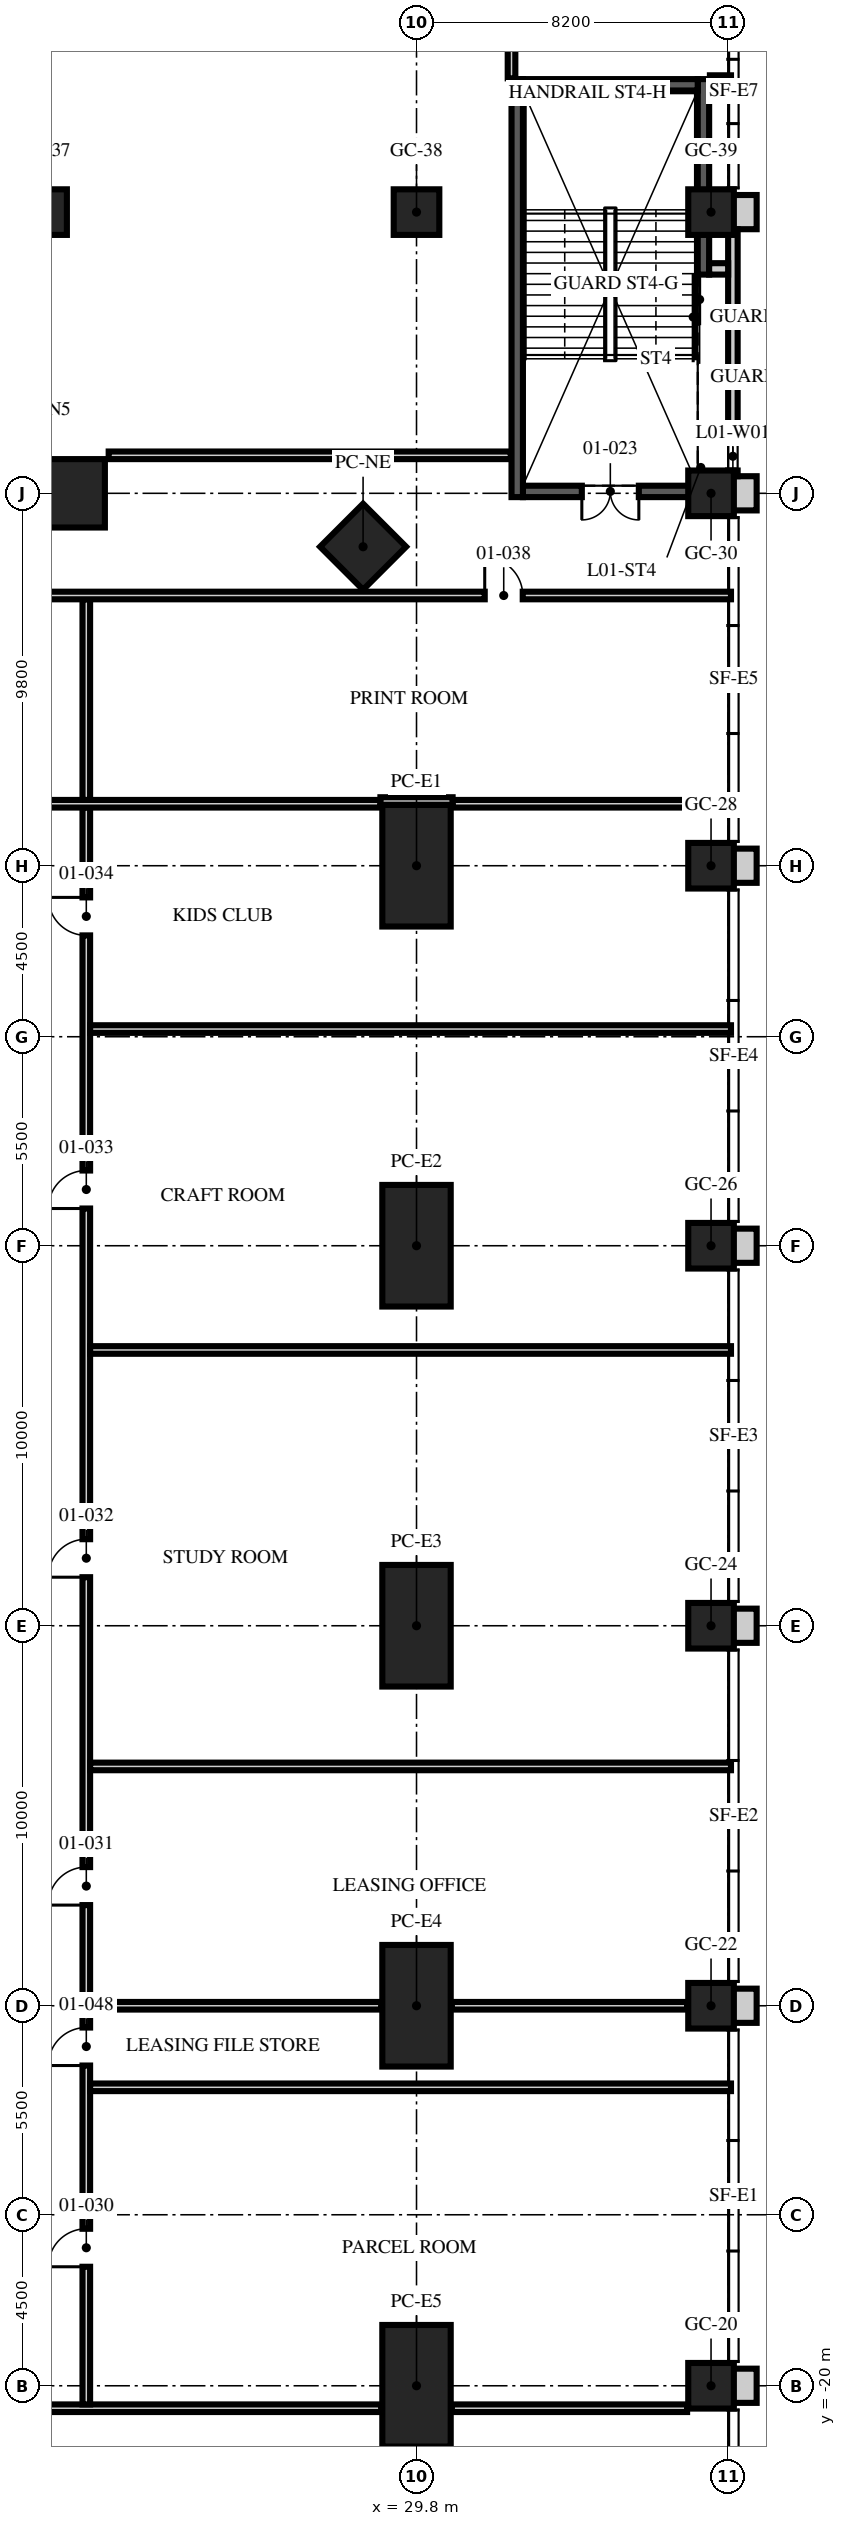
"""IFC4 building model, lengths in metres.
Left out: names, types, materials, properties, quantities, classifications, styles, units other than length and angle.
Written with IfcOpenShell. Run it as: python <this file> out.ifc"""

import sys

from ifc_helpers import new_model, si_unit, direction, frame, frame_2d, origin, origin_2d, place, context, subcontext, project, spatial, rectangle, hollow_rectangle, extrude, element, fill, save


model = new_model("IFC4")
c1 = context("Model", 3, precision=1e-05, world=origin(), true_north=direction((0.0, 1.0)))
c2 = subcontext(c1, "Body", "Model", "MODEL_VIEW")
j1 = project(units=[si_unit("LENGTHUNIT", "METRE"), si_unit("PLANEANGLEUNIT", "RADIAN")], contexts=[c1])
p1 = place(None, origin())
s1 = spatial("IfcSite", under=j1, at=p1, CompositionType="ELEMENT")
p2 = place(p1, origin())
s2 = spatial("IfcBuilding", under=s1, at=p2, CompositionType="ELEMENT")
p3 = place(p2, frame((0.0, 0.0, 6.0)))
s3 = spatial("IfcBuildingStorey", under=s2, at=p3, CompositionType="ELEMENT", Elevation=6.0)
for number, where, z_axis, x_axis in (
    (1, (20.0, 29.8, 0.0), (0.0, 0.0, 1.0), (1.0, 0.0, 0.0)),
    (2, (29.8, 20.0, 0.0), (0.0, 0.0, 1.0), (0.0, 1.0, 0.0)),
    (3, (29.8, 10.0, 0.0), (0.0, 0.0, 1.0), (0.0, 1.0, 0.0)),
    (4, (29.8, 0.0, 0.0), (0.0, 0.0, 1.0), (0.0, 1.0, 0.0)),
    (5, (29.8, -10.0, 0.0), (0.0, 0.0, 1.0), (0.0, 1.0, 0.0)),
    (6, (29.8, -20.0, 0.0), (0.0, 0.0, 1.0), (0.0, 1.0, 0.0)),
):
    element("IfcColumn", number, at=place(p3, frame(where, z_axis=z_axis, x_axis=x_axis)), inside=s3, PredefinedType="COLUMN", context=c2, shape_type="SweptSolid", body=[
        extrude(hollow_rectangle(XDim=3.2, YDim=1.8, WallThickness=0.2, at=origin_2d()), origin(), (0.0, 0.0, 1.0), 5.0),
    ])
p4 = place(p3, frame((28.394, 28.394, 0.0), z_axis=(0.0, 0.0, 1.0), x_axis=(0.707106781187, -0.707106781187, 0.0)))
e7 = element("IfcColumn", 7, at=p4, inside=s3, PredefinedType="COLUMN", context=c2, shape_type="SweptSolid", body=[
    extrude(hollow_rectangle(XDim=1.6, YDim=1.6, WallThickness=0.1, at=origin_2d()), origin(), (0.0, 0.0, 1.0), 5.0),
])
for number, where, z_axis, x_axis in (
    (8, (37.55, -20.0, 0.0), (0.0, 0.0, 1.0), (1.0, 0.0, 0.0)),
    (9, (37.55, -10.0, 0.0), (0.0, 0.0, 1.0), (1.0, 0.0, 0.0)),
    (10, (37.55, 0.0, 0.0), (0.0, 0.0, 1.0), (1.0, 0.0, 0.0)),
    (11, (37.55, 10.0, 0.0), (0.0, 0.0, 1.0), (1.0, 0.0, 0.0)),
    (12, (37.55, 20.0, 0.0), (0.0, 0.0, 1.0), (1.0, 0.0, 0.0)),
    (13, (37.55, 29.8, 0.0), (0.0, 0.0, 1.0), (1.0, 0.0, 0.0)),
    (14, (20.0, 37.2, 0.0), (0.0, 0.0, 1.0), (1.0, 0.0, 0.0)),
    (15, (29.8, 37.2, 0.0), (0.0, 0.0, 1.0), (1.0, 0.0, 0.0)),
    (16, (37.55, 37.2, 0.0), (0.0, 0.0, 1.0), (1.0, 0.0, 0.0)),
):
    element("IfcColumn", number, at=place(p3, frame(where, z_axis=z_axis, x_axis=x_axis)), inside=s3, PredefinedType="COLUMN", context=c2, shape_type="SweptSolid", body=[
        extrude(rectangle(XDim=1.2, YDim=1.2, at=origin_2d()), origin(), (0.0, 0.0, 1.0), 5.0),
    ])
for number, where, z_axis, x_axis in (
    (17, (38.375, -20.45, 0.0), (0.0, 0.0, 1.0), (0.0, 1.0, 0.0)),
    (18, (38.375, -10.45, 0.0), (0.0, 0.0, 1.0), (0.0, 1.0, 0.0)),
    (19, (38.375, -0.45, 0.0), (0.0, 0.0, 1.0), (0.0, 1.0, 0.0)),
    (20, (38.375, 9.55, 0.0), (0.0, 0.0, 1.0), (0.0, 1.0, 0.0)),
    (21, (38.375, 19.55, 0.0), (0.0, 0.0, 1.0), (0.0, 1.0, 0.0)),
    (22, (38.375, 29.35, 0.0), (0.0, 0.0, 1.0), (0.0, 1.0, 0.0)),
    (23, (38.375, 36.75, 0.0), (0.0, 0.0, 1.0), (0.0, 1.0, 0.0)),
):
    element("IfcWall", number, at=place(p3, frame(where, z_axis=z_axis, x_axis=x_axis)), inside=s3, PredefinedType="SOLIDWALL", context=c2, shape_type="SweptSolid", body=[
        extrude(rectangle(XDim=0.9, YDim=0.75, at=frame_2d((0.45, 0.0))), origin(), (0.0, 0.0, 1.0), 5.0),
    ])
p5 = place(p3, frame((38.125, 30.25, 0.0), z_axis=(0.0, 0.0, 1.0), x_axis=(0.0, 1.0, 0.0)))
e24 = element("IfcWall", 24, at=p5, inside=s3, PredefinedType="SOLIDWALL", context=c2, shape_type="SweptSolid", body=[
    extrude(rectangle(XDim=6.5, YDim=0.25, at=frame_2d((3.25, 0.0))), origin(), (0.0, 0.0, 1.0), 5.0),
])
p6 = place(p5, frame((0.15, 0.0, 1.2)))
e25 = element("IfcOpeningElement", 25, at=p6, cuts=e24, PredefinedType="OPENING", context=c2, shape_type="SweptSolid", body=[
    extrude(rectangle(XDim=0.75, YDim=1.7, at=frame_2d((0.375, 0.85))), frame((0.0, 0.135, 0.0), z_axis=(0.0, -1.0, 0.0), x_axis=(1.0, 0.0, 0.0)), (0.0, 0.0, 1.0), 0.27),
])
p7 = place(p3, frame((37.35, 35.556, 0.0), z_axis=(0.0, 0.0, 1.0), x_axis=(0.0, 1.0, 0.0)))
e26 = element("IfcWall", 26, at=p7, inside=s3, PredefinedType="SOLIDWALL", context=c2, shape_type="SweptSolid", body=[
    extrude(rectangle(XDim=5.144, YDim=0.3, at=frame_2d((2.572, 0.0))), origin(), (0.0, 0.0, 1.0), 4.7),
])
p8 = place(p3, frame((38.0, 35.706, 0.0), z_axis=(0.0, 0.0, 1.0), x_axis=(-1.0, 0.0, 0.0)))
e27 = element("IfcWall", 27, at=p8, inside=s3, PredefinedType="PARTITIONING", context=c2, shape_type="SweptSolid", body=[
    extrude(rectangle(XDim=0.5, YDim=0.3, at=frame_2d((0.25, 0.0))), origin(), (0.0, 0.0, 1.0), 3.27),
])
p9 = place(p3, frame((38.0, 29.85, 0.0), z_axis=(0.0, 0.0, 1.0), x_axis=(-1.0, 0.0, 0.0)))
e28 = element("IfcWall", 28, at=p9, inside=s3, PredefinedType="SOLIDWALL", context=c2, shape_type="SweptSolid", body=[
    extrude(rectangle(XDim=5.4, YDim=0.3, at=frame_2d((2.7, 0.0))), origin(), (0.0, 0.0, 1.0), 4.7),
])
p10 = place(p9, frame((2.35, 0.0, 0.0)))
e29 = element("IfcOpeningElement", 29, at=p10, cuts=e28, PredefinedType="OPENING", context=c2, shape_type="SweptSolid", body=[
    extrude(rectangle(XDim=1.5, YDim=2.1, at=frame_2d((0.75, 1.05))), frame((0.0, 0.16, 0.0), z_axis=(0.0, -1.0, 0.0), x_axis=(1.0, 0.0, 0.0)), (0.0, 0.0, 1.0), 0.32),
])
p11 = place(p3, frame((32.45, 29.7, 0.0), z_axis=(0.0, 0.0, 1.0), x_axis=(0.0, 1.0, 0.0)))
e30 = element("IfcWall", 30, at=p11, inside=s3, PredefinedType="SOLIDWALL", context=c2, shape_type="SweptSolid", body=[
    extrude(rectangle(XDim=11.0, YDim=0.3, at=frame_2d((5.5, 0.0))), origin(), (0.0, 0.0, 1.0), 4.7),
])
p12 = place(p3, frame((37.2, 40.55, 0.0), z_axis=(0.0, 0.0, 1.0), x_axis=(-1.0, 0.0, 0.0)))
e31 = element("IfcWall", 31, at=p12, inside=s3, PredefinedType="SOLIDWALL", context=c2, shape_type="SweptSolid", body=[
    extrude(rectangle(XDim=4.6, YDim=0.3, at=frame_2d((2.3, 0.0))), origin(), (0.0, 0.0, 1.0), 4.7),
])
p13 = place(p3, frame((-28.87, -20.591, 0.0), z_axis=(0.0, 0.0, 1.0), x_axis=(1.0, 0.0, 0.0)))
e32 = element("IfcWall", 32, at=p13, inside=s3, PredefinedType="SOLIDWALL", context=c2, shape_type="SweptSolid", body=[
    extrude(rectangle(XDim=57.74, YDim=0.2, at=frame_2d((28.87, 0.0))), origin(), (0.0, 0.0, 1.0), 3.5),
])
p14 = place(p13, frame((11.071, 0.0, 0.0)))
e33 = element("IfcOpeningElement", 33, at=p14, cuts=e32, PredefinedType="OPENING", context=c2, shape_type="SweptSolid", body=[
    extrude(rectangle(XDim=1.8, YDim=2.4, at=frame_2d((0.9, 1.2))), frame((0.0, 0.11, 0.0), z_axis=(0.0, -1.0, 0.0), x_axis=(1.0, 0.0, 0.0)), (0.0, 0.0, 1.0), 0.22),
])
p15 = place(p13, frame((22.351, 0.0, 0.0)))
e34 = element("IfcOpeningElement", 34, at=p15, cuts=e32, PredefinedType="OPENING", context=c2, shape_type="SweptSolid", body=[
    extrude(rectangle(XDim=1.8, YDim=2.4, at=frame_2d((0.9, 1.2))), frame((0.0, 0.11, 0.0), z_axis=(0.0, -1.0, 0.0), x_axis=(1.0, 0.0, 0.0)), (0.0, 0.0, 1.0), 0.22),
])
p16 = place(p13, frame((37.897, 0.0, 0.0)))
e35 = element("IfcOpeningElement", 35, at=p16, cuts=e32, PredefinedType="OPENING", context=c2, shape_type="SweptSolid", body=[
    extrude(rectangle(XDim=1.8, YDim=2.4, at=frame_2d((0.9, 1.2))), frame((0.0, 0.11, 0.0), z_axis=(0.0, -1.0, 0.0), x_axis=(1.0, 0.0, 0.0)), (0.0, 0.0, 1.0), 0.22),
])
p17 = place(p13, frame((16.646, 0.0, 0.0)))
e36 = element("IfcOpeningElement", 36, at=p17, cuts=e32, PredefinedType="OPENING", context=c2, shape_type="SweptSolid", body=[
    extrude(rectangle(XDim=1.8, YDim=2.4, at=frame_2d((0.9, 1.2))), frame((0.0, 0.11, 0.0), z_axis=(0.0, -1.0, 0.0), x_axis=(1.0, 0.0, 0.0)), (0.0, 0.0, 1.0), 0.22),
])
p18 = place(p3, frame((30.73, -20.591, 0.0), z_axis=(0.0, 0.0, 1.0), x_axis=(1.0, 0.0, 0.0)))
e37 = element("IfcWall", 37, at=p18, inside=s3, PredefinedType="SOLIDWALL", context=c2, shape_type="SweptSolid", body=[
    extrude(rectangle(XDim=6.19, YDim=0.2, at=frame_2d((3.095, 0.0))), origin(), (0.0, 0.0, 1.0), 3.7),
])
p19 = place(p3, frame((21.111, -20.491, 0.0), z_axis=(0.0, 0.0, 1.0), x_axis=(0.0, 1.0, 0.0)))
e38 = element("IfcWall", 38, at=p19, inside=s3, PredefinedType="SOLIDWALL", context=c2, shape_type="SweptSolid", body=[
    extrude(rectangle(XDim=42.022, YDim=0.2, at=frame_2d((21.011, 0.0))), origin(), (0.0, 0.0, 1.0), 3.5),
])
p20 = place(p19, frame((3.623, 0.0, 0.0)))
e39 = element("IfcOpeningElement", 39, at=p20, cuts=e38, PredefinedType="OPENING", context=c2, shape_type="SweptSolid", body=[
    extrude(rectangle(XDim=1.0, YDim=2.1, at=frame_2d((0.5, 1.05))), frame((0.0, 0.11, 0.0), z_axis=(0.0, -1.0, 0.0), x_axis=(1.0, 0.0, 0.0)), (0.0, 0.0, 1.0), 0.22),
])
p21 = place(p19, frame((13.14, 0.0, 0.0)))
e40 = element("IfcOpeningElement", 40, at=p21, cuts=e38, PredefinedType="OPENING", context=c2, shape_type="SweptSolid", body=[
    extrude(rectangle(XDim=1.0, YDim=2.1, at=frame_2d((0.5, 1.05))), frame((0.0, 0.11, 0.0), z_axis=(0.0, -1.0, 0.0), x_axis=(1.0, 0.0, 0.0)), (0.0, 0.0, 1.0), 0.22),
])
p22 = place(p19, frame((21.769, 0.0, 0.0)))
e41 = element("IfcOpeningElement", 41, at=p22, cuts=e38, PredefinedType="OPENING", context=c2, shape_type="SweptSolid", body=[
    extrude(rectangle(XDim=1.0, YDim=2.1, at=frame_2d((0.5, 1.05))), frame((0.0, 0.11, 0.0), z_axis=(0.0, -1.0, 0.0), x_axis=(1.0, 0.0, 0.0)), (0.0, 0.0, 1.0), 0.22),
])
p23 = place(p19, frame((31.47, 0.0, 0.0)))
e42 = element("IfcOpeningElement", 42, at=p23, cuts=e38, PredefinedType="OPENING", context=c2, shape_type="SweptSolid", body=[
    extrude(rectangle(XDim=1.0, YDim=2.1, at=frame_2d((0.5, 1.05))), frame((0.0, 0.11, 0.0), z_axis=(0.0, -1.0, 0.0), x_axis=(1.0, 0.0, 0.0)), (0.0, 0.0, 1.0), 0.22),
])
p24 = place(p19, frame((38.657, 0.0, 0.0)))
e43 = element("IfcOpeningElement", 43, at=p24, cuts=e38, PredefinedType="OPENING", context=c2, shape_type="SweptSolid", body=[
    extrude(rectangle(XDim=1.0, YDim=2.1, at=frame_2d((0.5, 1.05))), frame((0.0, 0.11, 0.0), z_axis=(0.0, -1.0, 0.0), x_axis=(1.0, 0.0, 0.0)), (0.0, 0.0, 1.0), 0.22),
])
p25 = place(p19, frame((8.918, 0.0, 0.0)))
e44 = element("IfcOpeningElement", 44, at=p25, cuts=e38, PredefinedType="OPENING", context=c2, shape_type="SweptSolid", body=[
    extrude(rectangle(XDim=1.0, YDim=2.1, at=frame_2d((0.5, 1.05))), frame((0.0, 0.11, 0.0), z_axis=(0.0, -1.0, 0.0), x_axis=(1.0, 0.0, 0.0)), (0.0, 0.0, 1.0), 0.22),
])
p26 = place(p3, frame((21.211, -12.146, 0.0), z_axis=(0.0, 0.0, 1.0), x_axis=(1.0, 0.0, 0.0)))
e45 = element("IfcWall", 45, at=p26, inside=s3, PredefinedType="SOLIDWALL", context=c2, shape_type="SweptSolid", body=[
    extrude(rectangle(XDim=16.864, YDim=0.2, at=frame_2d((8.432, 0.0))), origin(), (0.0, 0.0, 1.0), 3.7),
])
p27 = place(p3, frame((21.211, -10.0, 0.0), z_axis=(0.0, 0.0, 1.0), x_axis=(1.0, 0.0, 0.0)))
e46 = element("IfcWall", 46, at=p27, inside=s3, PredefinedType="SOLIDWALL", context=c2, shape_type="SweptSolid", body=[
    extrude(rectangle(XDim=7.659, YDim=0.2, at=frame_2d((3.83, 0.0))), origin(), (0.0, 0.0, 1.0), 3.5),
])
p28 = place(p3, frame((30.73, -10.0, 0.0), z_axis=(0.0, 0.0, 1.0), x_axis=(1.0, 0.0, 0.0)))
e47 = element("IfcWall", 47, at=p28, inside=s3, PredefinedType="SOLIDWALL", context=c2, shape_type="SweptSolid", body=[
    extrude(rectangle(XDim=6.19, YDim=0.2, at=frame_2d((3.095, 0.0))), origin(), (0.0, 0.0, 1.0), 3.7),
])
for number, where, z_axis, x_axis in (
    (48, (21.211, -3.702, 0.0), (0.0, 0.0, 1.0), (1.0, 0.0, 0.0)),
    (49, (21.211, 7.257, 0.0), (0.0, 0.0, 1.0), (1.0, 0.0, 0.0)),
    (50, (21.211, 15.702, 0.0), (0.0, 0.0, 1.0), (1.0, 0.0, 0.0)),
):
    element("IfcWall", number, at=place(p3, frame(where, z_axis=z_axis, x_axis=x_axis)), inside=s3, PredefinedType="SOLIDWALL", context=c2, shape_type="SweptSolid", body=[
        extrude(rectangle(XDim=16.864, YDim=0.2, at=frame_2d((8.432, 0.0))), origin(), (0.0, 0.0, 1.0), 3.7),
    ])
p29 = place(p3, frame((1.9, 21.631, 0.0), z_axis=(0.0, 0.0, 1.0), x_axis=(1.0, 0.0, 0.0)))
e51 = element("IfcWall", 51, at=p29, inside=s3, PredefinedType="SOLIDWALL", context=c2, shape_type="SweptSolid", body=[
    extrude(rectangle(XDim=26.95, YDim=0.2, at=frame_2d((13.475, 0.0))), origin(), (0.0, 0.0, 1.0), 3.5),
])
p30 = place(p29, frame((9.166, 0.0, 0.0)))
e52 = element("IfcOpeningElement", 52, at=p30, cuts=e51, PredefinedType="OPENING", context=c2, shape_type="SweptSolid", body=[
    extrude(rectangle(XDim=1.0, YDim=2.1, at=frame_2d((0.5, 1.05))), frame((0.0, 0.11, 0.0), z_axis=(0.0, -1.0, 0.0), x_axis=(1.0, 0.0, 0.0)), (0.0, 0.0, 1.0), 0.22),
])
p31 = place(p3, frame((30.75, 21.631, 0.0), z_axis=(0.0, 0.0, 1.0), x_axis=(1.0, 0.0, 0.0)))
e53 = element("IfcWall", 53, at=p31, inside=s3, PredefinedType="SOLIDWALL", context=c2, shape_type="SweptSolid", body=[
    extrude(rectangle(XDim=7.325, YDim=0.2, at=frame_2d((3.663, 0.0))), origin(), (0.0, 0.0, 1.0), 3.7),
])
p32 = place(p3, frame((28.85, 21.702, 0.0), z_axis=(0.0, 0.0, 1.0), x_axis=(1.0, 0.0, 0.0)))
e54 = element("IfcWall", 54, at=p32, inside=s3, PredefinedType="SOLIDWALL", context=c2, shape_type="SweptSolid", body=[
    extrude(rectangle(XDim=1.9, YDim=0.2, at=frame_2d((0.95, 0.0))), origin(), (0.0, 0.0, 1.0), 3.7),
])
p33 = place(p3, frame((21.111, 21.731, 0.0), z_axis=(0.0, 0.0, 1.0), x_axis=(0.0, 1.0, 0.0)))
e55 = element("IfcWall", 55, at=p33, inside=s3, PredefinedType="SOLIDWALL", context=c2, shape_type="SweptSolid", body=[
    extrude(rectangle(XDim=5.28, YDim=0.2, at=frame_2d((2.64, 0.0))), origin(), (0.0, 0.0, 1.0), 4.7),
])
p34 = place(p3, frame((1.9, 27.111, 0.0), z_axis=(0.0, 0.0, 1.0), x_axis=(1.0, 0.0, 0.0)))
e56 = element("IfcWall", 56, at=p34, inside=s3, PredefinedType="SOLIDWALL", context=c2, shape_type="SweptSolid", body=[
    extrude(rectangle(XDim=36.175, YDim=0.2, at=frame_2d((18.087, 0.0))), origin(), (0.0, 0.0, 1.0), 3.5),
])
p35 = place(p34, frame((29.695, 0.0, 0.0)))
e57 = element("IfcOpeningElement", 57, at=p35, cuts=e56, PredefinedType="OPENING", context=c2, shape_type="SweptSolid", body=[
    extrude(rectangle(XDim=1.0, YDim=2.1, at=frame_2d((0.5, 1.05))), frame((0.0, 0.11, 0.0), z_axis=(0.0, -1.0, 0.0), x_axis=(1.0, 0.0, 0.0)), (0.0, 0.0, 1.0), 0.22),
])
p36 = place(p3, frame((21.7, 30.8, 0.0), z_axis=(0.0, 0.0, 1.0), x_axis=(1.0, 0.0, 0.0)))
e58 = element("IfcWall", 58, at=p36, inside=s3, PredefinedType="SOLIDWALL", context=c2, shape_type="SweptSolid", body=[
    extrude(rectangle(XDim=10.58, YDim=0.2, at=frame_2d((5.29, 0.0))), origin(), (0.0, 0.0, 1.0), 4.7),
])
p37 = place(p3, frame((37.52, 40.7, 0.0), z_axis=(0.0, 0.0, 1.0), x_axis=(1.0, 0.0, 0.0)))
e59 = element("IfcWall", 59, at=p37, inside=s3, PredefinedType="SOLIDWALL", context=c2, shape_type="SweptSolid", body=[
    extrude(rectangle(XDim=0.555, YDim=0.2, at=frame_2d((0.277, 0.0))), origin(), (0.0, 0.0, 1.0), 3.27),
])
p38 = place(p3, frame((32.3, 40.72, 0.0), z_axis=(0.0, 0.0, 1.0), x_axis=(0.0, 1.0, 0.0)))
e60 = element("IfcWall", 60, at=p38, inside=s3, PredefinedType="SOLIDWALL", context=c2, shape_type="SweptSolid", body=[
    extrude(rectangle(XDim=3.355, YDim=0.2, at=frame_2d((1.677, 0.0))), origin(), (0.0, 0.0, 1.0), 3.7),
])
p39 = place(p38, frame((1.18, 0.0, 0.0)))
e61 = element("IfcOpeningElement", 61, at=p39, cuts=e60, PredefinedType="OPENING", context=c2, shape_type="SweptSolid", body=[
    extrude(rectangle(XDim=0.9, YDim=2.1, at=frame_2d((0.45, 1.05))), frame((0.0, 0.11, 0.0), z_axis=(0.0, -1.0, 0.0), x_axis=(1.0, 0.0, 0.0)), (0.0, 0.0, 1.0), 0.22),
])
p40 = place(p6, origin())
e62 = element("IfcWindow", 62, at=p40, inside=s3, PartitioningType="SINGLE_PANEL", PredefinedType="WINDOW", context=c2, shape_type="SweptSolid", body=[
    extrude(rectangle(XDim=0.75, YDim=1.7, at=frame_2d((0.375, 0.85))), frame((0.0, 0.03, 0.0), z_axis=(0.0, -1.0, 0.0), x_axis=(1.0, 0.0, 0.0)), (0.0, 0.0, 1.0), 0.06),
])
fill(e25, e62)
p41 = place(p10, origin())
e63 = element("IfcDoor", 63, at=p41, inside=s3, OperationType="DOUBLE_DOOR_SINGLE_SWING", PredefinedType="DOOR", context=c2, shape_type="SweptSolid", body=[
    extrude(rectangle(XDim=1.5, YDim=2.1, at=frame_2d((0.75, 1.05))), frame((0.0, 0.025, 0.0), z_axis=(0.0, -1.0, 0.0), x_axis=(1.0, 0.0, 0.0)), (0.0, 0.0, 1.0), 0.05),
])
fill(e29, e63)
p42 = place(p20, origin())
e64 = element("IfcDoor", 64, at=p42, inside=s3, OperationType="SINGLE_SWING_LEFT", PredefinedType="DOOR", context=c2, shape_type="SweptSolid", body=[
    extrude(rectangle(XDim=1.0, YDim=2.1, at=frame_2d((0.5, 1.05))), frame((0.0, 0.025, 0.0), z_axis=(0.0, -1.0, 0.0), x_axis=(1.0, 0.0, 0.0)), (0.0, 0.0, 1.0), 0.05),
])
fill(e39, e64)
p43 = place(p21, origin())
e65 = element("IfcDoor", 65, at=p43, inside=s3, OperationType="SINGLE_SWING_LEFT", PredefinedType="DOOR", context=c2, shape_type="SweptSolid", body=[
    extrude(rectangle(XDim=1.0, YDim=2.1, at=frame_2d((0.5, 1.05))), frame((0.0, 0.025, 0.0), z_axis=(0.0, -1.0, 0.0), x_axis=(1.0, 0.0, 0.0)), (0.0, 0.0, 1.0), 0.05),
])
fill(e40, e65)
p44 = place(p22, origin())
e66 = element("IfcDoor", 66, at=p44, inside=s3, OperationType="SINGLE_SWING_LEFT", PredefinedType="DOOR", context=c2, shape_type="SweptSolid", body=[
    extrude(rectangle(XDim=1.0, YDim=2.1, at=frame_2d((0.5, 1.05))), frame((0.0, 0.025, 0.0), z_axis=(0.0, -1.0, 0.0), x_axis=(1.0, 0.0, 0.0)), (0.0, 0.0, 1.0), 0.05),
])
fill(e41, e66)
p45 = place(p23, origin())
e67 = element("IfcDoor", 67, at=p45, inside=s3, OperationType="SINGLE_SWING_LEFT", PredefinedType="DOOR", context=c2, shape_type="SweptSolid", body=[
    extrude(rectangle(XDim=1.0, YDim=2.1, at=frame_2d((0.5, 1.05))), frame((0.0, 0.025, 0.0), z_axis=(0.0, -1.0, 0.0), x_axis=(1.0, 0.0, 0.0)), (0.0, 0.0, 1.0), 0.05),
])
fill(e42, e67)
p46 = place(p24, origin())
e68 = element("IfcDoor", 68, at=p46, inside=s3, OperationType="SINGLE_SWING_RIGHT", PredefinedType="DOOR", context=c2, shape_type="SweptSolid", body=[
    extrude(rectangle(XDim=1.0, YDim=2.1, at=frame_2d((0.5, 1.05))), frame((0.0, 0.025, 0.0), z_axis=(0.0, -1.0, 0.0), x_axis=(1.0, 0.0, 0.0)), (0.0, 0.0, 1.0), 0.05),
])
fill(e43, e68)
p47 = place(p35, origin())
e69 = element("IfcDoor", 69, at=p47, inside=s3, OperationType="SINGLE_SWING_LEFT", PredefinedType="DOOR", context=c2, shape_type="SweptSolid", body=[
    extrude(rectangle(XDim=1.0, YDim=2.1, at=frame_2d((0.5, 1.05))), frame((0.0, 0.025, 0.0), z_axis=(0.0, -1.0, 0.0), x_axis=(1.0, 0.0, 0.0)), (0.0, 0.0, 1.0), 0.05),
])
fill(e57, e69)
p48 = place(p25, origin())
e70 = element("IfcDoor", 70, at=p48, inside=s3, OperationType="SINGLE_SWING_LEFT", PredefinedType="DOOR", context=c2, shape_type="SweptSolid", body=[
    extrude(rectangle(XDim=1.0, YDim=2.1, at=frame_2d((0.5, 1.05))), frame((0.0, 0.025, 0.0), z_axis=(0.0, -1.0, 0.0), x_axis=(1.0, 0.0, 0.0)), (0.0, 0.0, 1.0), 0.05),
])
fill(e44, e70)
save(model, sys.argv[1])
